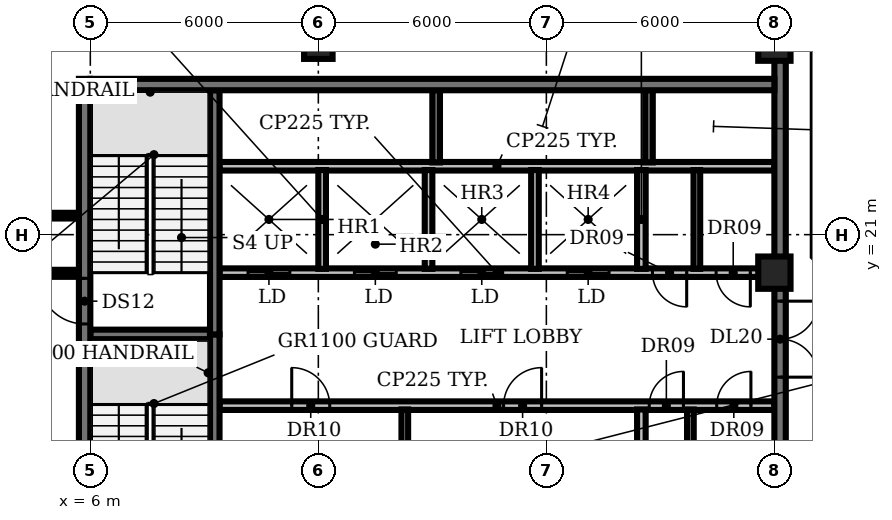
"""IFC4 building model, lengths in metres.
Left out: names, types, materials, properties, quantities, classifications, styles, units other than length and angle.
Written with IfcOpenShell. Run it as: python <this file> out.ifc"""

import sys

from ifc_helpers import new_model, si_unit, direction, frame, frame_2d, origin, origin_2d, place, context, subcontext, project, spatial, rectangle, circle, extrude, element, fill, save


model = new_model("IFC4")
c1 = context("Model", 3, precision=1e-05, world=origin(), true_north=direction((0.0, 1.0)))
c2 = subcontext(c1, "Body", "Model", "MODEL_VIEW")
j1 = project(units=[si_unit("LENGTHUNIT", "METRE"), si_unit("PLANEANGLEUNIT", "RADIAN")], contexts=[c1])
p1 = place(None, origin())
s1 = spatial("IfcSite", under=j1, at=p1, CompositionType="ELEMENT")
p2 = place(p1, origin())
s2 = spatial("IfcBuilding", under=s1, at=p2, CompositionType="ELEMENT")
p3 = place(p2, frame((0.0, 0.0, 264.2)))
s3 = spatial("IfcBuildingStorey", under=s2, at=p3, CompositionType="ELEMENT", Elevation=264.2)
p4 = place(p3, frame((12.0, 26.0, -0.35), z_axis=(0.0, 0.0, 1.0), x_axis=(1.0, 0.0, 0.0)))
e1 = element("IfcColumn", 1, at=p4, inside=s3, PredefinedType="COLUMN", context=c2, shape_type="SweptSolid", body=[
    extrude(rectangle(XDim=0.75, YDim=0.75, at=origin_2d()), origin(), (0.0, 0.0, 1.0), 4.2),
])
p5 = place(p3, frame((24.0, 20.0, 0.0), z_axis=(0.0, 0.0, 1.0), x_axis=(1.0, 0.0, 0.0)))
e2 = element("IfcColumn", 2, at=p5, inside=s3, PredefinedType="COLUMN", context=c2, shape_type="SweptSolid", body=[
    extrude(circle(Radius=0.425, at=origin_2d()), origin(), (0.0, 0.0, 1.0), 3.85),
])
p6 = place(p3, frame((24.0, 26.0, -0.35), z_axis=(0.0, 0.0, 1.0), x_axis=(1.0, 0.0, 0.0)))
e3 = element("IfcColumn", 3, at=p6, inside=s3, PredefinedType="COLUMN", context=c2, shape_type="SweptSolid", body=[
    extrude(rectangle(XDim=0.85, YDim=0.85, at=origin_2d()), origin(), (0.0, 0.0, 1.0), 4.2),
])
p7 = place(p3, frame((9.4, 16.5, 0.0), z_axis=(0.0, 0.0, 1.0), x_axis=(1.0, 0.0, 0.0)))
e4 = element("IfcWall", 4, at=p7, inside=s3, PredefinedType="PARTITIONING", context=c2, shape_type="SweptSolid", body=[
    extrude(rectangle(XDim=14.6, YDim=0.225, at=frame_2d((7.3, 0.0))), origin(), (0.0, 0.0, 1.0), 3.85),
])
p8 = place(p7, frame((1.9, 0.0, 0.0)))
e5 = element("IfcOpeningElement", 5, at=p8, cuts=e4, PredefinedType="OPENING", context=c2, shape_type="SweptSolid", body=[
    extrude(rectangle(XDim=1.0, YDim=2.1, at=frame_2d((0.5, 1.05))), frame((0.0, 0.123, 0.0), z_axis=(0.0, -1.0, 0.0), x_axis=(1.0, 0.0, 0.0)), (0.0, 0.0, 1.0), 0.245),
])
p9 = place(p7, frame((7.475, 0.0, 0.0)))
e6 = element("IfcOpeningElement", 6, at=p9, cuts=e4, PredefinedType="OPENING", context=c2, shape_type="SweptSolid", body=[
    extrude(rectangle(XDim=1.0, YDim=2.1, at=frame_2d((0.5, 1.05))), frame((0.0, 0.123, 0.0), z_axis=(0.0, -1.0, 0.0), x_axis=(1.0, 0.0, 0.0)), (0.0, 0.0, 1.0), 0.245),
])
p10 = place(p7, frame((11.308, 0.0, 0.0)))
e7 = element("IfcOpeningElement", 7, at=p10, cuts=e4, PredefinedType="OPENING", context=c2, shape_type="SweptSolid", body=[
    extrude(rectangle(XDim=0.9, YDim=2.1, at=frame_2d((0.45, 1.05))), frame((0.0, 0.123, 0.0), z_axis=(0.0, -1.0, 0.0), x_axis=(1.0, 0.0, 0.0)), (0.0, 0.0, 1.0), 0.245),
])
p11 = place(p7, frame((13.083, 0.0, 0.0)))
e8 = element("IfcOpeningElement", 8, at=p11, cuts=e4, PredefinedType="OPENING", context=c2, shape_type="SweptSolid", body=[
    extrude(rectangle(XDim=0.9, YDim=2.1, at=frame_2d((0.45, 1.05))), frame((0.0, 0.123, 0.0), z_axis=(0.0, -1.0, 0.0), x_axis=(1.0, 0.0, 0.0)), (0.0, 0.0, 1.0), 0.245),
])
p12 = place(p3, frame((6.0, 18.375, 0.0), z_axis=(0.0, 0.0, 1.0), x_axis=(1.0, 0.0, 0.0)))
e9 = element("IfcWall", 9, at=p12, inside=s3, PredefinedType="SHEAR", context=c2, shape_type="SweptSolid", body=[
    extrude(rectangle(XDim=3.15, YDim=0.25, at=frame_2d((1.575, 0.0))), origin(), (0.0, 0.0, 1.0), 3.85),
])
p13 = place(p3, frame((24.0, 20.0, 0.0), z_axis=(0.0, 0.0, 1.0), x_axis=(-1.0, 0.0, 0.0)))
e10 = element("IfcWall", 10, at=p13, inside=s3, PredefinedType="PARTITIONING", context=c2, shape_type="SweptSolid", body=[
    extrude(rectangle(XDim=14.6, YDim=0.225, at=frame_2d((7.3, 0.0))), origin(), (0.0, 0.0, 1.0), 3.85),
])
p14 = place(p13, frame((12.75, 0.0, 0.0)))
e11 = element("IfcOpeningElement", 11, at=p14, cuts=e10, PredefinedType="OPENING", context=c2, shape_type="SweptSolid", body=[
    extrude(rectangle(XDim=1.1, YDim=2.1, at=frame_2d((0.55, 1.05))), frame((0.0, 0.123, 0.0), z_axis=(0.0, -1.0, 0.0), x_axis=(1.0, 0.0, 0.0)), (0.0, 0.0, 1.0), 0.245),
])
p15 = place(p13, frame((9.95, 0.0, 0.0)))
e12 = element("IfcOpeningElement", 12, at=p15, cuts=e10, PredefinedType="OPENING", context=c2, shape_type="SweptSolid", body=[
    extrude(rectangle(XDim=1.1, YDim=2.1, at=frame_2d((0.55, 1.05))), frame((0.0, 0.123, 0.0), z_axis=(0.0, -1.0, 0.0), x_axis=(1.0, 0.0, 0.0)), (0.0, 0.0, 1.0), 0.245),
])
p16 = place(p13, frame((7.15, 0.0, 0.0)))
e13 = element("IfcOpeningElement", 13, at=p16, cuts=e10, PredefinedType="OPENING", context=c2, shape_type="SweptSolid", body=[
    extrude(rectangle(XDim=1.1, YDim=2.1, at=frame_2d((0.55, 1.05))), frame((0.0, 0.123, 0.0), z_axis=(0.0, -1.0, 0.0), x_axis=(1.0, 0.0, 0.0)), (0.0, 0.0, 1.0), 0.245),
])
p17 = place(p13, frame((4.35, 0.0, 0.0)))
e14 = element("IfcOpeningElement", 14, at=p17, cuts=e10, PredefinedType="OPENING", context=c2, shape_type="SweptSolid", body=[
    extrude(rectangle(XDim=1.1, YDim=2.1, at=frame_2d((0.55, 1.05))), frame((0.0, 0.123, 0.0), z_axis=(0.0, -1.0, 0.0), x_axis=(1.0, 0.0, 0.0)), (0.0, 0.0, 1.0), 0.245),
])
p18 = place(p13, frame((2.308, 0.0, 0.0)))
e15 = element("IfcOpeningElement", 15, at=p18, cuts=e10, PredefinedType="OPENING", context=c2, shape_type="SweptSolid", body=[
    extrude(rectangle(XDim=0.9, YDim=2.1, at=frame_2d((0.45, 1.05))), frame((0.0, 0.123, 0.0), z_axis=(0.0, -1.0, 0.0), x_axis=(1.0, 0.0, 0.0)), (0.0, 0.0, 1.0), 0.245),
])
p19 = place(p13, frame((0.633, 0.0, 0.0)))
e16 = element("IfcOpeningElement", 16, at=p19, cuts=e10, PredefinedType="OPENING", context=c2, shape_type="SweptSolid", body=[
    extrude(rectangle(XDim=0.9, YDim=2.1, at=frame_2d((0.45, 1.05))), frame((0.0, 0.123, 0.0), z_axis=(0.0, -1.0, 0.0), x_axis=(1.0, 0.0, 0.0)), (0.0, 0.0, 1.0), 0.245),
])
p20 = place(p3, frame((9.4, 22.8, 0.0), z_axis=(0.0, 0.0, 1.0), x_axis=(1.0, 0.0, 0.0)))
e17 = element("IfcWall", 17, at=p20, inside=s3, PredefinedType="PARTITIONING", context=c2, shape_type="SweptSolid", body=[
    extrude(rectangle(XDim=14.6, YDim=0.225, at=frame_2d((7.3, 0.0))), origin(), (0.0, 0.0, 1.0), 3.85),
])
p21 = place(p3, frame((9.275, 18.375, 0.0), z_axis=(0.0, 0.0, 1.0), x_axis=(0.0, -1.0, 0.0)))
e18 = element("IfcWall", 18, at=p21, inside=s3, PredefinedType="SHEAR", context=c2, shape_type="SweptSolid", body=[
    extrude(rectangle(XDim=6.55, YDim=0.25, at=frame_2d((3.275, 0.0))), origin(), (0.0, 0.0, 1.0), 3.85),
])
p22 = place(p21, frame((5.075, 0.0, 0.0)))
e19 = element("IfcOpeningElement", 19, at=p22, cuts=e18, PredefinedType="OPENING", context=c2, shape_type="SweptSolid", body=[
    extrude(rectangle(XDim=1.0, YDim=2.1, at=frame_2d((0.5, 1.05))), frame((0.0, 0.135, 0.0), z_axis=(0.0, -1.0, 0.0), x_axis=(1.0, 0.0, 0.0)), (0.0, 0.0, 1.0), 0.27),
])
p23 = place(p3, frame((9.275, 18.375, 0.0), z_axis=(0.0, 0.0, 1.0), x_axis=(0.0, 1.0, 0.0)))
e20 = element("IfcWall", 20, at=p23, inside=s3, PredefinedType="SHEAR", context=c2, shape_type="SweptSolid", body=[
    extrude(rectangle(XDim=6.425, YDim=0.25, at=frame_2d((3.212, 0.0))), origin(), (0.0, 0.0, 1.0), 3.85),
])
p24 = place(p3, frame((12.1, 20.1, 0.0), z_axis=(0.0, 0.0, 1.0), x_axis=(0.0, 1.0, 0.0)))
e21 = element("IfcWall", 21, at=p24, inside=s3, PredefinedType="SOLIDWALL", context=c2, shape_type="SweptSolid", body=[
    extrude(rectangle(XDim=2.6, YDim=0.2, at=frame_2d((1.3, 0.0))), origin(), (0.0, 0.0, 1.0), 3.85),
])
p25 = place(p3, frame((14.275, 13.8, 0.0), z_axis=(0.0, 0.0, 1.0), x_axis=(0.0, 1.0, 0.0)))
e22 = element("IfcWall", 22, at=p25, inside=s3, PredefinedType="PARTITIONING", context=c2, shape_type="SweptSolid", body=[
    extrude(rectangle(XDim=2.6, YDim=0.175, at=frame_2d((1.3, 0.0))), origin(), (0.0, 0.0, 1.0), 3.85),
])
p26 = place(p3, frame((14.9, 20.1, 0.0), z_axis=(0.0, 0.0, 1.0), x_axis=(0.0, 1.0, 0.0)))
e23 = element("IfcWall", 23, at=p26, inside=s3, PredefinedType="SOLIDWALL", context=c2, shape_type="SweptSolid", body=[
    extrude(rectangle(XDim=2.6, YDim=0.2, at=frame_2d((1.3, 0.0))), origin(), (0.0, 0.0, 1.0), 3.85),
])
p27 = place(p3, frame((15.1, 22.9, 0.0), z_axis=(0.0, 0.0, 1.0), x_axis=(0.0, 1.0, 0.0)))
e24 = element("IfcWall", 24, at=p27, inside=s3, PredefinedType="SHEAR", context=c2, shape_type="SweptSolid", body=[
    extrude(rectangle(XDim=1.9, YDim=0.2, at=frame_2d((0.95, 0.0))), origin(), (0.0, 0.0, 1.0), 3.85),
])
p28 = place(p3, frame((17.7, 20.1, 0.0), z_axis=(0.0, 0.0, 1.0), x_axis=(0.0, 1.0, 0.0)))
e25 = element("IfcWall", 25, at=p28, inside=s3, PredefinedType="SOLIDWALL", context=c2, shape_type="SweptSolid", body=[
    extrude(rectangle(XDim=2.6, YDim=0.2, at=frame_2d((1.3, 0.0))), origin(), (0.0, 0.0, 1.0), 3.85),
])
for number, where, z_axis, x_axis in (
    (26, (20.5, 13.8, 0.0), (0.0, 0.0, 1.0), (0.0, 1.0, 0.0)),
    (27, (20.5, 20.1, 0.0), (0.0, 0.0, 1.0), (0.0, 1.0, 0.0)),
):
    element("IfcWall", number, at=place(p3, frame(where, z_axis=z_axis, x_axis=x_axis)), inside=s3, PredefinedType="PARTITIONING", context=c2, shape_type="SweptSolid", body=[
        extrude(rectangle(XDim=2.6, YDim=0.225, at=frame_2d((1.3, 0.0))), origin(), (0.0, 0.0, 1.0), 3.85),
    ])
p29 = place(p3, frame((20.7, 22.9, 0.0), z_axis=(0.0, 0.0, 1.0), x_axis=(0.0, 1.0, 0.0)))
e28 = element("IfcWall", 28, at=p29, inside=s3, PredefinedType="SHEAR", context=c2, shape_type="SweptSolid", body=[
    extrude(rectangle(XDim=1.9, YDim=0.2, at=frame_2d((0.95, 0.0))), origin(), (0.0, 0.0, 1.0), 3.85),
])
for number, where, z_axis, x_axis in (
    (29, (21.79, 13.8, 0.0), (0.0, 0.0, 1.0), (0.0, 1.0, 0.0)),
    (30, (21.96, 20.1, 0.0), (0.0, 0.0, 1.0), (0.0, 1.0, 0.0)),
):
    element("IfcWall", number, at=place(p3, frame(where, z_axis=z_axis, x_axis=x_axis)), inside=s3, PredefinedType="PARTITIONING", context=c2, shape_type="SweptSolid", body=[
        extrude(rectangle(XDim=2.6, YDim=0.175, at=frame_2d((1.3, 0.0))), origin(), (0.0, 0.0, 1.0), 3.85),
    ])
p30 = place(p3, frame((5.85, 5.1, 0.0), z_axis=(0.0, 0.0, 1.0), x_axis=(0.0, 1.0, 0.0)))
e31 = element("IfcWall", 31, at=p30, inside=s3, PredefinedType="SHEAR", context=c2, shape_type="SweptSolid", body=[
    extrude(rectangle(XDim=20.0, YDim=0.3, at=frame_2d((10.0, 0.0))), origin(), (0.0, 0.0, 1.0), 3.85),
])
p31 = place(p30, frame((0.55, 0.0, 0.0)))
e32 = element("IfcOpeningElement", 32, at=p31, cuts=e31, PredefinedType="OPENING", context=c2, shape_type="SweptSolid", body=[
    extrude(rectangle(XDim=1.5, YDim=2.1, at=frame_2d((0.75, 1.05))), frame((0.0, 0.16, 0.0), z_axis=(0.0, -1.0, 0.0), x_axis=(1.0, 0.0, 0.0)), (0.0, 0.0, 1.0), 0.32),
])
p32 = place(p30, frame((7.0, 0.0, 0.0)))
e33 = element("IfcOpeningElement", 33, at=p32, cuts=e31, PredefinedType="OPENING", context=c2, shape_type="SweptSolid", body=[
    extrude(rectangle(XDim=1.2, YDim=2.1, at=frame_2d((0.6, 1.05))), frame((0.0, 0.16, 0.0), z_axis=(0.0, -1.0, 0.0), x_axis=(1.0, 0.0, 0.0)), (0.0, 0.0, 1.0), 0.32),
])
p33 = place(p30, frame((13.55, 0.0, 0.0)))
e34 = element("IfcOpeningElement", 34, at=p33, cuts=e31, PredefinedType="OPENING", context=c2, shape_type="SweptSolid", body=[
    extrude(rectangle(XDim=1.2, YDim=2.1, at=frame_2d((0.6, 1.05))), frame((0.0, 0.16, 0.0), z_axis=(0.0, -1.0, 0.0), x_axis=(1.0, 0.0, 0.0)), (0.0, 0.0, 1.0), 0.32),
])
p34 = place(p3, frame((24.15, 25.605, 0.0), z_axis=(0.0, 0.0, 1.0), x_axis=(0.0, -1.0, 0.0)))
e35 = element("IfcWall", 35, at=p34, inside=s3, PredefinedType="SHEAR", context=c2, shape_type="SweptSolid", body=[
    extrude(rectangle(XDim=20.505, YDim=0.3, at=frame_2d((10.252, 0.0))), origin(), (0.0, 0.0, 1.0), 3.85),
])
p35 = place(p34, frame((18.455, 0.0, 0.0)))
e36 = element("IfcOpeningElement", 36, at=p35, cuts=e35, PredefinedType="OPENING", context=c2, shape_type="SweptSolid", body=[
    extrude(rectangle(XDim=1.5, YDim=2.1, at=frame_2d((0.75, 1.05))), frame((0.0, 0.16, 0.0), z_axis=(0.0, -1.0, 0.0), x_axis=(1.0, 0.0, 0.0)), (0.0, 0.0, 1.0), 0.32),
])
p36 = place(p34, frame((12.355, 0.0, 0.0)))
e37 = element("IfcOpeningElement", 37, at=p36, cuts=e35, PredefinedType="OPENING", context=c2, shape_type="SweptSolid", body=[
    extrude(rectangle(XDim=0.9, YDim=2.1, at=frame_2d((0.45, 1.05))), frame((0.0, 0.16, 0.0), z_axis=(0.0, -1.0, 0.0), x_axis=(1.0, 0.0, 0.0)), (0.0, 0.0, 1.0), 0.32),
])
p37 = place(p34, frame((6.355, 0.0, 0.0)))
e38 = element("IfcOpeningElement", 38, at=p37, cuts=e35, PredefinedType="OPENING", context=c2, shape_type="SweptSolid", body=[
    extrude(rectangle(XDim=2.0, YDim=2.1, at=frame_2d((1.0, 1.05))), frame((0.0, 0.16, 0.0), z_axis=(0.0, -1.0, 0.0), x_axis=(1.0, 0.0, 0.0)), (0.0, 0.0, 1.0), 0.32),
])
p38 = place(p3, frame((6.0, 24.95, 0.0), z_axis=(0.0, 0.0, 1.0), x_axis=(1.0, 0.0, 0.0)))
e39 = element("IfcWall", 39, at=p38, inside=s3, PredefinedType="SHEAR", context=c2, shape_type="SweptSolid", body=[
    extrude(rectangle(XDim=18.0, YDim=0.3, at=frame_2d((9.0, 0.0))), origin(), (0.0, 0.0, 1.0), 3.85),
])
for number, where, z_axis, x_axis in (
    (40, (4.65, 20.0, 0.0), (0.0, 0.0, 1.0), (1.0, 0.0, 0.0)),
    (41, (4.65, 21.5, 0.0), (0.0, 0.0, 1.0), (1.0, 0.0, 0.0)),
):
    element("IfcWall", number, at=place(p3, frame(where, z_axis=z_axis, x_axis=x_axis)), inside=s3, PredefinedType="PARTITIONING", context=c2, shape_type="SweptSolid", body=[
        extrude(rectangle(XDim=1.05, YDim=0.15, at=frame_2d((0.525, 0.0))), origin(), (0.0, 0.0, 1.0), 2.9),
    ])
p39 = place(p8, origin())
e42 = element("IfcDoor", 42, at=p39, inside=s3, OperationType="SINGLE_SWING_LEFT", PredefinedType="DOOR", context=c2, shape_type="SweptSolid", body=[
    extrude(rectangle(XDim=1.0, YDim=2.1, at=frame_2d((0.5, 1.05))), frame((0.0, 0.025, 0.0), z_axis=(0.0, -1.0, 0.0), x_axis=(1.0, 0.0, 0.0)), (0.0, 0.0, 1.0), 0.05),
])
fill(e5, e42)
p40 = place(p9, origin())
e43 = element("IfcDoor", 43, at=p40, inside=s3, OperationType="SINGLE_SWING_RIGHT", PredefinedType="DOOR", context=c2, shape_type="SweptSolid", body=[
    extrude(rectangle(XDim=1.0, YDim=2.1, at=frame_2d((0.5, 1.05))), frame((0.0, 0.025, 0.0), z_axis=(0.0, -1.0, 0.0), x_axis=(1.0, 0.0, 0.0)), (0.0, 0.0, 1.0), 0.05),
])
fill(e6, e43)
p41 = place(p10, origin())
e44 = element("IfcDoor", 44, at=p41, inside=s3, OperationType="SINGLE_SWING_RIGHT", PredefinedType="DOOR", context=c2, shape_type="SweptSolid", body=[
    extrude(rectangle(XDim=0.9, YDim=2.1, at=frame_2d((0.45, 1.05))), frame((0.0, 0.025, 0.0), z_axis=(0.0, -1.0, 0.0), x_axis=(1.0, 0.0, 0.0)), (0.0, 0.0, 1.0), 0.05),
])
fill(e7, e44)
p42 = place(p11, origin())
e45 = element("IfcDoor", 45, at=p42, inside=s3, OperationType="SINGLE_SWING_RIGHT", PredefinedType="DOOR", context=c2, shape_type="SweptSolid", body=[
    extrude(rectangle(XDim=0.9, YDim=2.1, at=frame_2d((0.45, 1.05))), frame((0.0, 0.025, 0.0), z_axis=(0.0, -1.0, 0.0), x_axis=(1.0, 0.0, 0.0)), (0.0, 0.0, 1.0), 0.05),
])
fill(e8, e45)
p43 = place(p14, origin())
e46 = element("IfcDoor", 46, at=p43, inside=s3, OperationType="DOUBLE_DOOR_SLIDING", PredefinedType="DOOR", context=c2, shape_type="SweptSolid", body=[
    extrude(rectangle(XDim=1.1, YDim=2.1, at=frame_2d((0.55, 1.05))), frame((0.0, 0.025, 0.0), z_axis=(0.0, -1.0, 0.0), x_axis=(1.0, 0.0, 0.0)), (0.0, 0.0, 1.0), 0.05),
])
fill(e11, e46)
p44 = place(p15, origin())
e47 = element("IfcDoor", 47, at=p44, inside=s3, OperationType="DOUBLE_DOOR_SLIDING", PredefinedType="DOOR", context=c2, shape_type="SweptSolid", body=[
    extrude(rectangle(XDim=1.1, YDim=2.1, at=frame_2d((0.55, 1.05))), frame((0.0, 0.025, 0.0), z_axis=(0.0, -1.0, 0.0), x_axis=(1.0, 0.0, 0.0)), (0.0, 0.0, 1.0), 0.05),
])
fill(e12, e47)
p45 = place(p16, origin())
e48 = element("IfcDoor", 48, at=p45, inside=s3, OperationType="DOUBLE_DOOR_SLIDING", PredefinedType="DOOR", context=c2, shape_type="SweptSolid", body=[
    extrude(rectangle(XDim=1.1, YDim=2.1, at=frame_2d((0.55, 1.05))), frame((0.0, 0.025, 0.0), z_axis=(0.0, -1.0, 0.0), x_axis=(1.0, 0.0, 0.0)), (0.0, 0.0, 1.0), 0.05),
])
fill(e13, e48)
p46 = place(p17, origin())
e49 = element("IfcDoor", 49, at=p46, inside=s3, OperationType="DOUBLE_DOOR_SLIDING", PredefinedType="DOOR", context=c2, shape_type="SweptSolid", body=[
    extrude(rectangle(XDim=1.1, YDim=2.1, at=frame_2d((0.55, 1.05))), frame((0.0, 0.025, 0.0), z_axis=(0.0, -1.0, 0.0), x_axis=(1.0, 0.0, 0.0)), (0.0, 0.0, 1.0), 0.05),
])
fill(e14, e49)
p47 = place(p18, origin())
e50 = element("IfcDoor", 50, at=p47, inside=s3, OperationType="SINGLE_SWING_LEFT", PredefinedType="DOOR", context=c2, shape_type="SweptSolid", body=[
    extrude(rectangle(XDim=0.9, YDim=2.1, at=frame_2d((0.45, 1.05))), frame((0.0, 0.025, 0.0), z_axis=(0.0, -1.0, 0.0), x_axis=(1.0, 0.0, 0.0)), (0.0, 0.0, 1.0), 0.05),
])
fill(e15, e50)
p48 = place(p19, origin())
e51 = element("IfcDoor", 51, at=p48, inside=s3, OperationType="SINGLE_SWING_LEFT", PredefinedType="DOOR", context=c2, shape_type="SweptSolid", body=[
    extrude(rectangle(XDim=0.9, YDim=2.1, at=frame_2d((0.45, 1.05))), frame((0.0, 0.025, 0.0), z_axis=(0.0, -1.0, 0.0), x_axis=(1.0, 0.0, 0.0)), (0.0, 0.0, 1.0), 0.05),
])
fill(e16, e51)
p49 = place(p33, origin())
e52 = element("IfcDoor", 52, at=p49, inside=s3, OperationType="SINGLE_SWING_RIGHT", PredefinedType="DOOR", context=c2, shape_type="SweptSolid", body=[
    extrude(rectangle(XDim=1.2, YDim=2.1, at=frame_2d((0.6, 1.05))), frame((0.0, 0.025, 0.0), z_axis=(0.0, -1.0, 0.0), x_axis=(1.0, 0.0, 0.0)), (0.0, 0.0, 1.0), 0.05),
])
fill(e34, e52)
p50 = place(p37, origin())
e53 = element("IfcDoor", 53, at=p50, inside=s3, OperationType="DOUBLE_DOOR_SINGLE_SWING", PredefinedType="DOOR", context=c2, shape_type="SweptSolid", body=[
    extrude(rectangle(XDim=2.0, YDim=2.1, at=frame_2d((1.0, 1.05))), frame((0.0, 0.025, 0.0), z_axis=(0.0, -1.0, 0.0), x_axis=(1.0, 0.0, 0.0)), (0.0, 0.0, 1.0), 0.05),
])
fill(e38, e53)
save(model, sys.argv[1])
